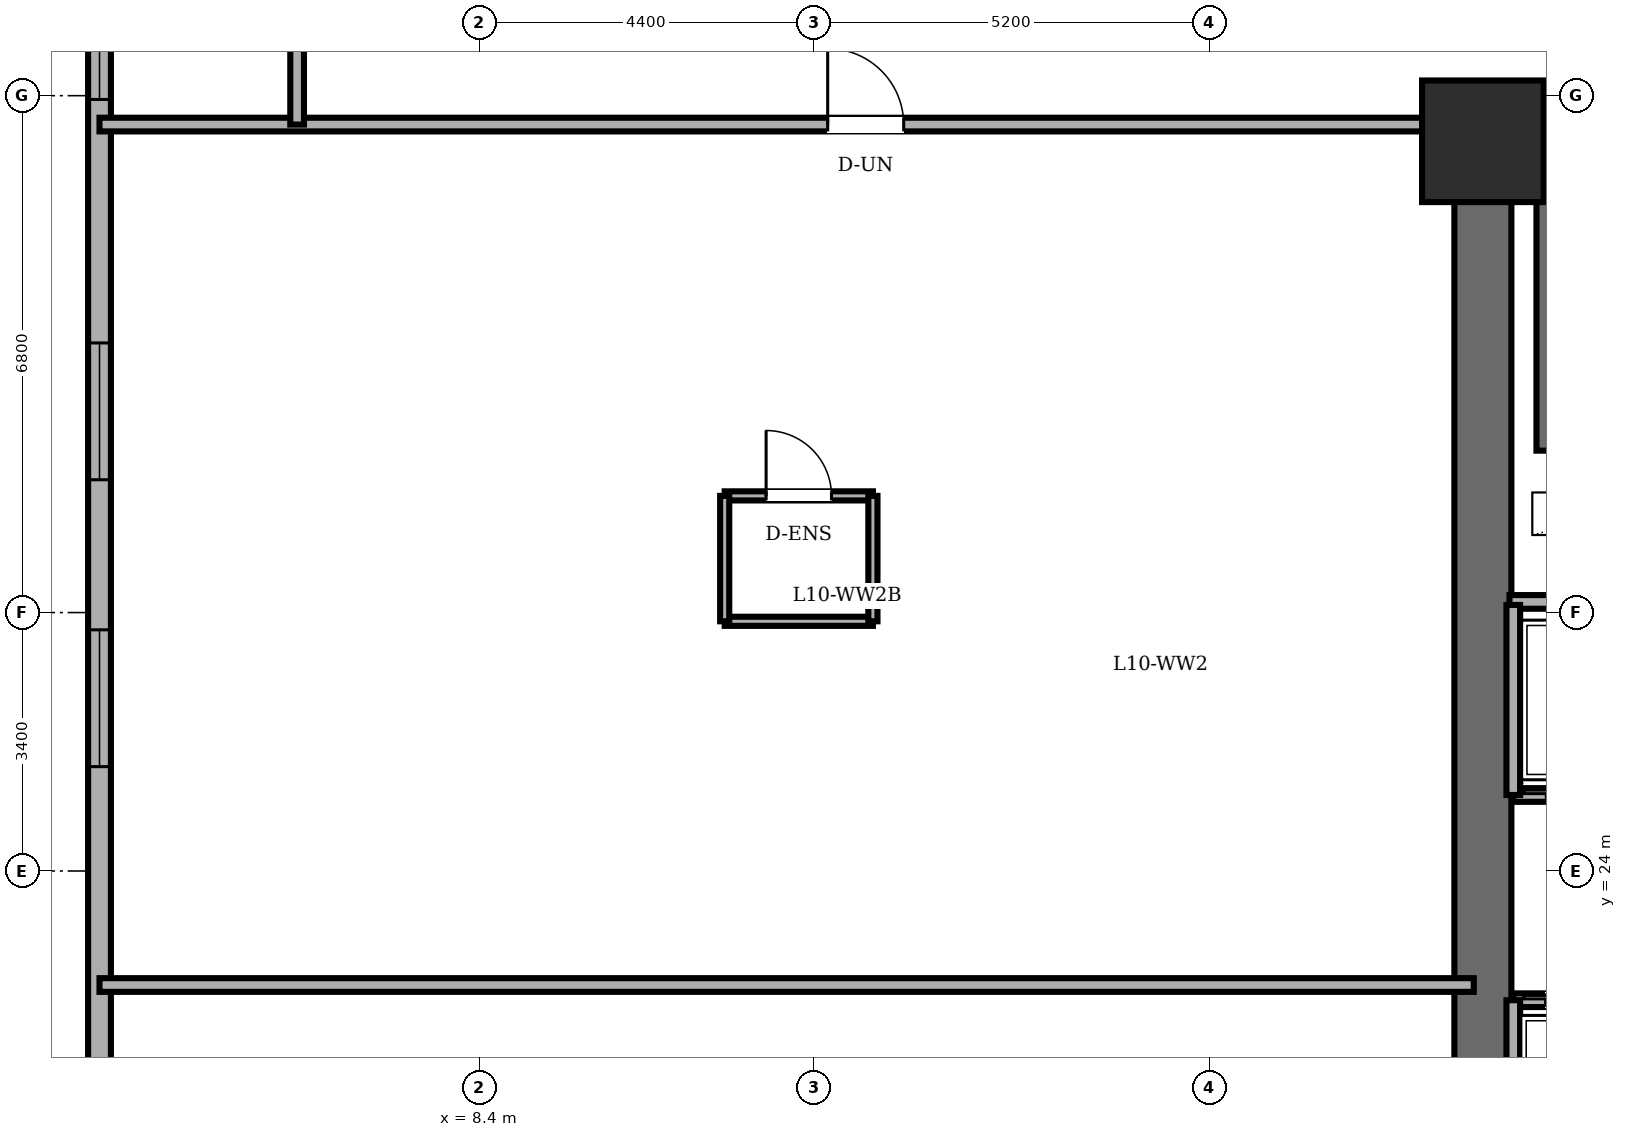
"""IFC4 building model, lengths in metres.
Left out: names, types, materials, properties, quantities, classifications, styles, units other than length and angle.
Written with IfcOpenShell. Run it as: python <this file> out.ifc"""

import sys

from ifc_helpers import new_model, si_unit, direction, frame, frame_2d, origin, origin_2d, place, context, subcontext, project, spatial, rectangle, extrude, element, fill, save


model = new_model("IFC4")
c1 = context("Model", 3, precision=1e-05, world=origin(), true_north=direction((0.0, 1.0)))
c2 = subcontext(c1, "Body", "Model", "MODEL_VIEW")
j1 = project(units=[si_unit("LENGTHUNIT", "METRE"), si_unit("PLANEANGLEUNIT", "RADIAN")], contexts=[c1])
p1 = place(None, origin())
s1 = spatial("IfcSite", under=j1, at=p1, CompositionType="ELEMENT")
p2 = place(p1, origin())
s2 = spatial("IfcBuilding", under=s1, at=p2, CompositionType="ELEMENT")
p3 = place(p2, frame((0.0, 0.0, 39.6)))
s3 = spatial("IfcBuildingStorey", under=s2, at=p3, CompositionType="ELEMENT", Elevation=39.6)
p4 = place(p3, frame((21.6, 33.6, 0.0), z_axis=(0.0, 0.0, 1.0), x_axis=(1.0, 0.0, 0.0)))
e1 = element("IfcColumn", 1, at=p4, inside=s3, PredefinedType="COLUMN", context=c2, shape_type="SweptSolid", body=[
    extrude(rectangle(XDim=1.6, YDim=1.6, at=origin_2d()), origin(), (0.0, 0.0, 1.0), 3.6),
])
p5 = place(p3, frame((3.4, 40.2, 0.0), z_axis=(0.0, 0.0, 1.0), x_axis=(0.0, -1.0, 0.0)))
e2 = element("IfcWall", 2, at=p5, inside=s3, PredefinedType="SOLIDWALL", context=c2, shape_type="SweptSolid", body=[
    extrude(rectangle(XDim=32.4, YDim=0.3, at=frame_2d((16.2, 0.0))), origin(), (0.0, 0.0, 1.0), 3.4),
])
p6 = place(p5, frame((1.235, 0.0, 0.85)))
e3 = element("IfcOpeningElement", 3, at=p6, cuts=e2, PredefinedType="OPENING", context=c2, shape_type="SweptSolid", body=[
    extrude(rectangle(XDim=1.8, YDim=1.55, at=frame_2d((0.9, 0.775))), frame((0.0, 0.16, 0.0), z_axis=(0.0, -1.0, 0.0), x_axis=(1.0, 0.0, 0.0)), (0.0, 0.0, 1.0), 0.32),
])
p7 = place(p5, frame((4.25, 0.0, 0.85)))
e4 = element("IfcOpeningElement", 4, at=p7, cuts=e2, PredefinedType="OPENING", context=c2, shape_type="SweptSolid", body=[
    extrude(rectangle(XDim=1.8, YDim=1.55, at=frame_2d((0.9, 0.775))), frame((0.0, 0.16, 0.0), z_axis=(0.0, -1.0, 0.0), x_axis=(1.0, 0.0, 0.0)), (0.0, 0.0, 1.0), 0.32),
])
p8 = place(p5, frame((9.253, 0.0, 0.85)))
e5 = element("IfcOpeningElement", 5, at=p8, cuts=e2, PredefinedType="OPENING", context=c2, shape_type="SweptSolid", body=[
    extrude(rectangle(XDim=1.8, YDim=1.55, at=frame_2d((0.9, 0.775))), frame((0.0, 0.16, 0.0), z_axis=(0.0, -1.0, 0.0), x_axis=(1.0, 0.0, 0.0)), (0.0, 0.0, 1.0), 0.32),
])
p9 = place(p5, frame((13.027, 0.0, 0.85)))
e6 = element("IfcOpeningElement", 6, at=p9, cuts=e2, PredefinedType="OPENING", context=c2, shape_type="SweptSolid", body=[
    extrude(rectangle(XDim=1.8, YDim=1.55, at=frame_2d((0.9, 0.775))), frame((0.0, 0.16, 0.0), z_axis=(0.0, -1.0, 0.0), x_axis=(1.0, 0.0, 0.0)), (0.0, 0.0, 1.0), 0.32),
])
p10 = place(p5, frame((19.573, 0.0, 0.85)))
e7 = element("IfcOpeningElement", 7, at=p10, cuts=e2, PredefinedType="OPENING", context=c2, shape_type="SweptSolid", body=[
    extrude(rectangle(XDim=1.8, YDim=1.55, at=frame_2d((0.9, 0.775))), frame((0.0, 0.16, 0.0), z_axis=(0.0, -1.0, 0.0), x_axis=(1.0, 0.0, 0.0)), (0.0, 0.0, 1.0), 0.32),
])
p11 = place(p5, frame((22.347, 0.0, 0.85)))
e8 = element("IfcOpeningElement", 8, at=p11, cuts=e2, PredefinedType="OPENING", context=c2, shape_type="SweptSolid", body=[
    extrude(rectangle(XDim=1.8, YDim=1.55, at=frame_2d((0.9, 0.775))), frame((0.0, 0.16, 0.0), z_axis=(0.0, -1.0, 0.0), x_axis=(1.0, 0.0, 0.0)), (0.0, 0.0, 1.0), 0.32),
])
p12 = place(p5, frame((26.35, 0.0, 0.85)))
e9 = element("IfcOpeningElement", 9, at=p12, cuts=e2, PredefinedType="OPENING", context=c2, shape_type="SweptSolid", body=[
    extrude(rectangle(XDim=1.8, YDim=1.55, at=frame_2d((0.9, 0.775))), frame((0.0, 0.16, 0.0), z_axis=(0.0, -1.0, 0.0), x_axis=(1.0, 0.0, 0.0)), (0.0, 0.0, 1.0), 0.32),
])
p13 = place(p5, frame((29.365, 0.0, 0.85)))
e10 = element("IfcOpeningElement", 10, at=p13, cuts=e2, PredefinedType="OPENING", context=c2, shape_type="SweptSolid", body=[
    extrude(rectangle(XDim=1.8, YDim=1.55, at=frame_2d((0.9, 0.775))), frame((0.0, 0.16, 0.0), z_axis=(0.0, -1.0, 0.0), x_axis=(1.0, 0.0, 0.0)), (0.0, 0.0, 1.0), 0.32),
])
p14 = place(p3, frame((21.6, 14.4, 0.0), z_axis=(0.0, 0.0, 1.0), x_axis=(0.0, 1.0, 0.0)))
e11 = element("IfcWall", 11, at=p14, inside=s3, PredefinedType="SHEAR", context=c2, shape_type="SweptSolid", body=[
    extrude(rectangle(XDim=19.2, YDim=0.75, at=frame_2d((9.6, 0.0))), origin(), (0.0, 0.0, 1.0), 3.4),
])
p15 = place(p3, frame((21.6, 33.6, 0.0), z_axis=(0.0, 0.0, 1.0), x_axis=(1.0, 0.0, 0.0)))
e12 = element("IfcWall", 12, at=p15, inside=s3, PredefinedType="SHEAR", context=c2, shape_type="SweptSolid", body=[
    extrude(rectangle(XDim=15.6, YDim=0.75, at=frame_2d((7.8, 0.0))), origin(), (0.0, 0.0, 1.0), 3.4),
])
p16 = place(p3, frame((22.48, 29.53, 0.0), z_axis=(0.0, 0.0, 1.0), x_axis=(0.0, 1.0, 0.0)))
e13 = element("IfcWall", 13, at=p16, inside=s3, PredefinedType="SOLIDWALL", context=c2, shape_type="SweptSolid", body=[
    extrude(rectangle(XDim=3.58, YDim=0.35, at=frame_2d((1.79, 0.0))), origin(), (0.0, 0.0, 1.0), 3.4),
])
p17 = place(p3, frame((21.95, 27.54, 0.0), z_axis=(0.0, 0.0, 1.0), x_axis=(1.0, 0.0, 0.0)))
e14 = element("IfcWall", 14, at=p17, inside=s3, PredefinedType="PARTITIONING", context=c2, shape_type="SweptSolid", body=[
    extrude(rectangle(XDim=10.56, YDim=0.18, at=frame_2d((5.28, 0.0))), origin(), (0.0, 0.0, 1.0), 3.4),
])
p18 = place(p3, frame((24.02, 25.0, 0.0), z_axis=(0.0, 0.0, 1.0), x_axis=(-1.0, 0.0, 0.0)))
e15 = element("IfcWall", 15, at=p18, inside=s3, PredefinedType="PARTITIONING", context=c2, shape_type="SweptSolid", body=[
    extrude(rectangle(XDim=2.02, YDim=0.18, at=frame_2d((1.01, 0.0))), origin(), (0.0, 0.0, 1.0), 3.4),
])
p19 = place(p18, frame((0.435, 0.0, 0.0)))
e16 = element("IfcOpeningElement", 16, at=p19, cuts=e15, PredefinedType="OPENING", context=c2, shape_type="SweptSolid", body=[
    extrude(rectangle(XDim=1.15, YDim=2.2, at=frame_2d((0.575, 1.1))), frame((0.0, 0.1, 0.0), z_axis=(0.0, -1.0, 0.0), x_axis=(1.0, 0.0, 0.0)), (0.0, 0.0, 1.0), 0.2),
])
p20 = place(p3, frame((22.0, 27.5, 0.0), z_axis=(0.0, 0.0, 1.0), x_axis=(0.0, -1.0, 0.0)))
e17 = element("IfcWall", 17, at=p20, inside=s3, PredefinedType="PARTITIONING", context=c2, shape_type="SweptSolid", body=[
    extrude(rectangle(XDim=2.5, YDim=0.18, at=frame_2d((1.25, 0.0))), origin(), (0.0, 0.0, 1.0), 3.4),
])
p21 = place(p3, frame((22.0, 22.3, 0.0), z_axis=(0.0, 0.0, 1.0), x_axis=(1.0, 0.0, 0.0)))
e18 = element("IfcWall", 18, at=p21, inside=s3, PredefinedType="PARTITIONING", context=c2, shape_type="SweptSolid", body=[
    extrude(rectangle(XDim=2.0, YDim=0.18, at=frame_2d((1.0, 0.0))), origin(), (0.0, 0.0, 1.0), 3.4),
])
p22 = place(p21, frame((0.425, 0.0, 0.0)))
e19 = element("IfcOpeningElement", 19, at=p22, cuts=e18, PredefinedType="OPENING", context=c2, shape_type="SweptSolid", body=[
    extrude(rectangle(XDim=1.15, YDim=2.2, at=frame_2d((0.575, 1.1))), frame((0.0, 0.1, 0.0), z_axis=(0.0, -1.0, 0.0), x_axis=(1.0, 0.0, 0.0)), (0.0, 0.0, 1.0), 0.2),
])
p23 = place(p3, frame((22.0, 22.3, 0.0), z_axis=(0.0, 0.0, 1.0), x_axis=(0.0, -1.0, 0.0)))
e20 = element("IfcWall", 20, at=p23, inside=s3, PredefinedType="PARTITIONING", context=c2, shape_type="SweptSolid", body=[
    extrude(rectangle(XDim=2.5, YDim=0.18, at=frame_2d((1.25, 0.0))), origin(), (0.0, 0.0, 1.0), 3.4),
])
p24 = place(p3, frame((11.625, 28.935, 0.0), z_axis=(0.0, 0.0, 1.0), x_axis=(1.0, 0.0, 0.0)))
e21 = element("IfcWall", 21, at=p24, inside=s3, PredefinedType="PARTITIONING", context=c2, shape_type="SweptSolid", body=[
    extrude(rectangle(XDim=1.95, YDim=0.12, at=frame_2d((0.975, 0.0))), origin(), (0.0, 0.0, 1.0), 3.4),
])
p25 = place(p24, frame((0.545, 0.0, 0.0)))
e22 = element("IfcOpeningElement", 22, at=p25, cuts=e21, PredefinedType="OPENING", context=c2, shape_type="SweptSolid", body=[
    extrude(rectangle(XDim=0.86, YDim=2.1, at=frame_2d((0.43, 1.05))), frame((0.0, 0.07, 0.0), z_axis=(0.0, -1.0, 0.0), x_axis=(1.0, 0.0, 0.0)), (0.0, 0.0, 1.0), 0.14),
])
p26 = place(p3, frame((13.575, 27.285, 0.0), z_axis=(0.0, 0.0, 1.0), x_axis=(-1.0, 0.0, 0.0)))
e23 = element("IfcWall", 23, at=p26, inside=s3, PredefinedType="PARTITIONING", context=c2, shape_type="SweptSolid", body=[
    extrude(rectangle(XDim=1.95, YDim=0.12, at=frame_2d((0.975, 0.0))), origin(), (0.0, 0.0, 1.0), 3.4),
])
for number, where, z_axis, x_axis in (
    (24, (11.625, 28.935, 0.0), (0.0, 0.0, 1.0), (0.0, -1.0, 0.0)),
    (25, (13.575, 27.285, 0.0), (0.0, 0.0, 1.0), (0.0, 1.0, 0.0)),
):
    element("IfcWall", number, at=place(p3, frame(where, z_axis=z_axis, x_axis=x_axis)), inside=s3, PredefinedType="PARTITIONING", context=c2, shape_type="SweptSolid", body=[
        extrude(rectangle(XDim=1.65, YDim=0.12, at=frame_2d((0.825, 0.0))), origin(), (0.0, 0.0, 1.0), 3.4),
    ])
p27 = place(p3, frame((3.4, 22.5, 0.0), z_axis=(0.0, 0.0, 1.0), x_axis=(1.0, 0.0, 0.0)))
e26 = element("IfcWall", 26, at=p27, inside=s3, PredefinedType="PARTITIONING", context=c2, shape_type="SweptSolid", body=[
    extrude(rectangle(XDim=18.08, YDim=0.18, at=frame_2d((9.04, 0.0))), origin(), (0.0, 0.0, 1.0), 3.4),
])
p28 = place(p3, frame((3.4, 33.82, 0.0), z_axis=(0.0, 0.0, 1.0), x_axis=(1.0, 0.0, 0.0)))
e27 = element("IfcWall", 27, at=p28, inside=s3, PredefinedType="PARTITIONING", context=c2, shape_type="SweptSolid", body=[
    extrude(rectangle(XDim=18.08, YDim=0.18, at=frame_2d((9.04, 0.0))), origin(), (0.0, 0.0, 1.0), 3.4),
])
p29 = place(p28, frame((9.58, 0.0, 0.0)))
e28 = element("IfcOpeningElement", 28, at=p29, cuts=e27, PredefinedType="OPENING", context=c2, shape_type="SweptSolid", body=[
    extrude(rectangle(XDim=1.0, YDim=2.15, at=frame_2d((0.5, 1.075))), frame((0.0, 0.1, 0.0), z_axis=(0.0, -1.0, 0.0), x_axis=(1.0, 0.0, 0.0)), (0.0, 0.0, 1.0), 0.2),
])
p30 = place(p3, frame((6.0, 33.82, 0.0), z_axis=(0.0, 0.0, 1.0), x_axis=(0.0, 1.0, 0.0)))
e29 = element("IfcWall", 29, at=p30, inside=s3, PredefinedType="PARTITIONING", context=c2, shape_type="SweptSolid", body=[
    extrude(rectangle(XDim=2.46, YDim=0.18, at=frame_2d((1.23, 0.0))), origin(), (0.0, 0.0, 1.0), 3.4),
])
p31 = place(p7, origin())
e30 = element("IfcWindow", 30, at=p31, inside=s3, PartitioningType="DOUBLE_PANEL_VERTICAL", PredefinedType="WINDOW", context=c2, shape_type="SweptSolid", body=[
    extrude(rectangle(XDim=1.8, YDim=1.55, at=frame_2d((0.9, 0.775))), frame((0.0, 0.03, 0.0), z_axis=(0.0, -1.0, 0.0), x_axis=(1.0, 0.0, 0.0)), (0.0, 0.0, 1.0), 0.06),
])
fill(e4, e30)
p32 = place(p8, origin())
e31 = element("IfcWindow", 31, at=p32, inside=s3, PartitioningType="DOUBLE_PANEL_VERTICAL", PredefinedType="WINDOW", context=c2, shape_type="SweptSolid", body=[
    extrude(rectangle(XDim=1.8, YDim=1.55, at=frame_2d((0.9, 0.775))), frame((0.0, 0.03, 0.0), z_axis=(0.0, -1.0, 0.0), x_axis=(1.0, 0.0, 0.0)), (0.0, 0.0, 1.0), 0.06),
])
fill(e5, e31)
p33 = place(p9, origin())
e32 = element("IfcWindow", 32, at=p33, inside=s3, PartitioningType="DOUBLE_PANEL_VERTICAL", PredefinedType="WINDOW", context=c2, shape_type="SweptSolid", body=[
    extrude(rectangle(XDim=1.8, YDim=1.55, at=frame_2d((0.9, 0.775))), frame((0.0, 0.03, 0.0), z_axis=(0.0, -1.0, 0.0), x_axis=(1.0, 0.0, 0.0)), (0.0, 0.0, 1.0), 0.06),
])
fill(e6, e32)
p34 = place(p22, origin())
e33 = element("IfcDoor", 33, at=p34, inside=s3, OperationType="DOUBLE_DOOR_SLIDING", PredefinedType="DOOR", context=c2, shape_type="SweptSolid", body=[
    extrude(rectangle(XDim=1.15, YDim=2.2, at=frame_2d((0.575, 1.1))), frame((0.0, 0.025, 0.0), z_axis=(0.0, -1.0, 0.0), x_axis=(1.0, 0.0, 0.0)), (0.0, 0.0, 1.0), 0.05),
])
fill(e19, e33)
p35 = place(p25, origin())
e34 = element("IfcDoor", 34, at=p35, inside=s3, OperationType="SINGLE_SWING_LEFT", PredefinedType="DOOR", context=c2, shape_type="SweptSolid", body=[
    extrude(rectangle(XDim=0.86, YDim=2.1, at=frame_2d((0.43, 1.05))), frame((0.0, 0.025, 0.0), z_axis=(0.0, -1.0, 0.0), x_axis=(1.0, 0.0, 0.0)), (0.0, 0.0, 1.0), 0.05),
])
fill(e22, e34)
p36 = place(p29, origin())
e35 = element("IfcDoor", 35, at=p36, inside=s3, OperationType="SINGLE_SWING_LEFT", PredefinedType="DOOR", context=c2, shape_type="SweptSolid", body=[
    extrude(rectangle(XDim=1.0, YDim=2.15, at=frame_2d((0.5, 1.075))), frame((0.0, 0.025, 0.0), z_axis=(0.0, -1.0, 0.0), x_axis=(1.0, 0.0, 0.0)), (0.0, 0.0, 1.0), 0.05),
])
fill(e28, e35)
save(model, sys.argv[1])
